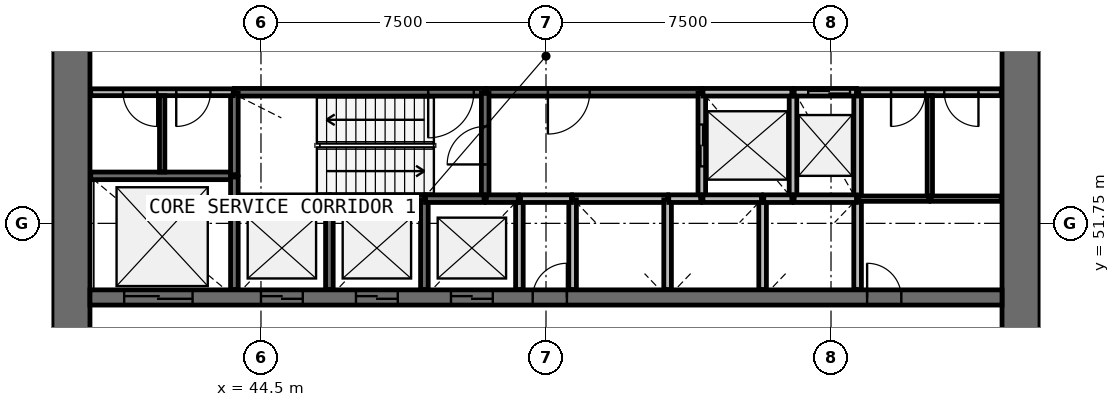
"""IFC4 building model, lengths in metres.
Left out: names, types, materials, properties, quantities, classifications, styles, units other than length and angle.
Written with IfcOpenShell. Run it as: python <this file> out.ifc"""

import sys

from ifc_helpers import new_model, si_unit, direction, frame, frame_2d, origin, place, context, subcontext, project, spatial, rectangle, extrude, source, transform, mapped, element, fill, save


model = new_model("IFC4")
c1 = context("Model", 3, precision=1e-05, world=origin(), true_north=direction((0.0, 1.0)))
c2 = subcontext(c1, "Body", "Model", "MODEL_VIEW")
j1 = project(units=[si_unit("LENGTHUNIT", "METRE"), si_unit("PLANEANGLEUNIT", "RADIAN")], contexts=[c1])
p1 = place(None, origin())
s1 = spatial("IfcSite", under=j1, at=p1, CompositionType="ELEMENT")
p2 = place(p1, origin())
s2 = spatial("IfcBuilding", under=s1, at=p2, CompositionType="ELEMENT")
p3 = place(p2, frame((0.0, 0.0, 18.2)))
s3 = spatial("IfcBuildingStorey", under=s2, at=p3, CompositionType="ELEMENT", Elevation=18.2)
p4 = place(p3, frame((64.5, 38.0, 0.0), z_axis=(0.0, 0.0, 1.0), x_axis=(0.0, 1.0, 0.0)))
e1 = element("IfcWall", 1, at=p4, inside=s3, PredefinedType="SHEAR", context=c2, shape_type="SweptSolid", body=[
    extrude(rectangle(XDim=20.0, YDim=1.0, at=frame_2d((10.0, 0.0))), origin(), (0.0, 0.0, 1.0), 4.4),
])
p5 = place(p4, frame((9.1, 0.0, 0.0)))
e2 = element("IfcOpeningElement", 2, at=p5, cuts=e1, PredefinedType="OPENING", context=c2, shape_type="SweptSolid", body=[
    extrude(rectangle(XDim=1.8, YDim=2.1, at=frame_2d((0.9, 1.05))), frame((0.0, 0.51, 0.0), z_axis=(0.0, -1.0, 0.0), x_axis=(1.0, 0.0, 0.0)), (0.0, 0.0, 1.0), 1.02),
])
p6 = place(p3, frame((39.5, 58.0, 0.0), z_axis=(0.0, 0.0, 1.0), x_axis=(0.0, -1.0, 0.0)))
e3 = element("IfcWall", 3, at=p6, inside=s3, PredefinedType="SHEAR", context=c2, shape_type="SweptSolid", body=[
    extrude(rectangle(XDim=20.0, YDim=1.0, at=frame_2d((10.0, 0.0))), origin(), (0.0, 0.0, 1.0), 4.4),
])
p7 = place(p6, frame((9.1, 0.0, 0.0)))
e4 = element("IfcOpeningElement", 4, at=p7, cuts=e3, PredefinedType="OPENING", context=c2, shape_type="SweptSolid", body=[
    extrude(rectangle(XDim=1.8, YDim=2.1, at=frame_2d((0.9, 1.05))), frame((0.0, 0.51, 0.0), z_axis=(0.0, -1.0, 0.0), x_axis=(1.0, 0.0, 0.0)), (0.0, 0.0, 1.0), 1.02),
])
p8 = place(p3, frame((40.0, 49.8, 0.0), z_axis=(0.0, 0.0, 1.0), x_axis=(1.0, 0.0, 0.0)))
e5 = element("IfcWall", 5, at=p8, inside=s3, PredefinedType="SHEAR", context=c2, shape_type="SweptSolid", body=[
    extrude(rectangle(XDim=24.0, YDim=0.4, at=frame_2d((12.0, 0.0))), origin(), (0.0, 0.0, 1.0), 4.4),
])
p9 = place(p8, frame((4.5, 0.0, 0.0)))
e6 = element("IfcOpeningElement", 6, at=p9, cuts=e5, PredefinedType="OPENING", context=c2, shape_type="SweptSolid", body=[
    extrude(rectangle(XDim=1.1, YDim=2.1, at=frame_2d((0.55, 1.05))), frame((0.0, 0.21, 0.0), z_axis=(0.0, -1.0, 0.0), x_axis=(1.0, 0.0, 0.0)), (0.0, 0.0, 1.0), 0.42),
])
p10 = place(p8, frame((7.0, 0.0, 0.0)))
e7 = element("IfcOpeningElement", 7, at=p10, cuts=e5, PredefinedType="OPENING", context=c2, shape_type="SweptSolid", body=[
    extrude(rectangle(XDim=1.1, YDim=2.1, at=frame_2d((0.55, 1.05))), frame((0.0, 0.21, 0.0), z_axis=(0.0, -1.0, 0.0), x_axis=(1.0, 0.0, 0.0)), (0.0, 0.0, 1.0), 0.42),
])
p11 = place(p8, frame((9.5, 0.0, 0.0)))
e8 = element("IfcOpeningElement", 8, at=p11, cuts=e5, PredefinedType="OPENING", context=c2, shape_type="SweptSolid", body=[
    extrude(rectangle(XDim=1.1, YDim=2.1, at=frame_2d((0.55, 1.05))), frame((0.0, 0.21, 0.0), z_axis=(0.0, -1.0, 0.0), x_axis=(1.0, 0.0, 0.0)), (0.0, 0.0, 1.0), 0.42),
])
p12 = place(p8, frame((0.9, 0.0, 0.0)))
e9 = element("IfcOpeningElement", 9, at=p12, cuts=e5, PredefinedType="OPENING", context=c2, shape_type="SweptSolid", body=[
    extrude(rectangle(XDim=1.8, YDim=2.4, at=frame_2d((0.9, 1.2))), frame((0.0, 0.21, 0.0), z_axis=(0.0, -1.0, 0.0), x_axis=(1.0, 0.0, 0.0)), (0.0, 0.0, 1.0), 0.42),
])
p13 = place(p8, frame((20.45, 0.0, 0.0)))
e10 = element("IfcOpeningElement", 10, at=p13, cuts=e5, PredefinedType="OPENING", context=c2, shape_type="SweptSolid", body=[
    extrude(rectangle(XDim=0.9, YDim=2.1, at=frame_2d((0.45, 1.05))), frame((0.0, 0.21, 0.0), z_axis=(0.0, -1.0, 0.0), x_axis=(1.0, 0.0, 0.0)), (0.0, 0.0, 1.0), 0.42),
])
p14 = place(p8, frame((11.65, 0.0, 0.0)))
e11 = element("IfcOpeningElement", 11, at=p14, cuts=e5, PredefinedType="OPENING", context=c2, shape_type="SweptSolid", body=[
    extrude(rectangle(XDim=0.9, YDim=2.1, at=frame_2d((0.45, 1.05))), frame((0.0, 0.21, 0.0), z_axis=(0.0, -1.0, 0.0), x_axis=(1.0, 0.0, 0.0)), (0.0, 0.0, 1.0), 0.42),
])
p15 = place(p3, frame((50.4, 55.2, 0.0), z_axis=(0.0, 0.0, 1.0), x_axis=(-1.0, 0.0, 0.0)))
e12 = element("IfcWall", 12, at=p15, inside=s3, PredefinedType="SOLIDWALL", context=c2, shape_type="SweptSolid", body=[
    extrude(rectangle(XDim=6.6, YDim=0.2, at=frame_2d((3.3, 0.0))), origin(), (0.0, 0.0, 1.0), 3.95),
])
p16 = place(p15, frame((0.3, 0.0, 0.0)))
e13 = element("IfcOpeningElement", 13, at=p16, cuts=e12, PredefinedType="OPENING", context=c2, shape_type="SweptSolid", body=[
    extrude(rectangle(XDim=1.2, YDim=2.1, at=frame_2d((0.6, 1.05))), frame((0.0, 0.11, 0.0), z_axis=(0.0, -1.0, 0.0), x_axis=(1.0, 0.0, 0.0)), (0.0, 0.0, 1.0), 0.22),
])
p17 = place(p3, frame((56.1, 55.2, 0.0), z_axis=(0.0, 0.0, 1.0), x_axis=(-1.0, 0.0, 0.0)))
e14 = element("IfcWall", 14, at=p17, inside=s3, PredefinedType="SOLIDWALL", context=c2, shape_type="SweptSolid", body=[
    extrude(rectangle(XDim=5.67, YDim=0.2, at=frame_2d((2.835, 0.0))), origin(), (0.0, 0.0, 1.0), 3.95),
])
p18 = place(p17, frame((2.95, 0.0, 0.0)))
e15 = element("IfcOpeningElement", 15, at=p18, cuts=e14, PredefinedType="OPENING", context=c2, shape_type="SweptSolid", body=[
    extrude(rectangle(XDim=1.1, YDim=2.1, at=frame_2d((0.55, 1.05))), frame((0.0, 0.11, 0.0), z_axis=(0.0, -1.0, 0.0), x_axis=(1.0, 0.0, 0.0)), (0.0, 0.0, 1.0), 0.22),
])
p19 = place(p3, frame((43.8, 53.0, 0.0), z_axis=(0.0, 0.0, 1.0), x_axis=(-1.0, 0.0, 0.0)))
e16 = element("IfcWall", 16, at=p19, inside=s3, PredefinedType="SOLIDWALL", context=c2, shape_type="SweptSolid", body=[
    extrude(rectangle(XDim=3.78, YDim=0.2, at=frame_2d((1.89, 0.0))), origin(), (0.0, 0.0, 1.0), 3.95),
])
p20 = place(p3, frame((50.4, 52.4, 0.0), z_axis=(0.0, 0.0, 1.0), x_axis=(0.0, 1.0, 0.0)))
e17 = element("IfcWall", 17, at=p20, inside=s3, PredefinedType="SOLIDWALL", context=c2, shape_type="SweptSolid", body=[
    extrude(rectangle(XDim=2.77, YDim=0.2, at=frame_2d((1.385, 0.0))), origin(), (0.0, 0.0, 1.0), 3.95),
])
p21 = place(p20, frame((0.9, 0.0, 0.0)))
e18 = element("IfcOpeningElement", 18, at=p21, cuts=e17, PredefinedType="OPENING", context=c2, shape_type="SweptSolid", body=[
    extrude(rectangle(XDim=1.0, YDim=2.1, at=frame_2d((0.5, 1.05))), frame((0.0, 0.11, 0.0), z_axis=(0.0, -1.0, 0.0), x_axis=(1.0, 0.0, 0.0)), (0.0, 0.0, 1.0), 0.22),
])
p22 = place(p3, frame((56.1, 55.17, 0.0), z_axis=(0.0, 0.0, 1.0), x_axis=(0.0, -1.0, 0.0)))
e19 = element("IfcWall", 19, at=p22, inside=s3, PredefinedType="SOLIDWALL", context=c2, shape_type="SweptSolid", body=[
    extrude(rectangle(XDim=2.77, YDim=0.2, at=frame_2d((1.385, 0.0))), origin(), (0.0, 0.0, 1.0), 3.95),
])
p23 = place(p22, frame((0.82, 0.0, 0.0)))
e20 = element("IfcOpeningElement", 20, at=p23, cuts=e19, PredefinedType="OPENING", context=c2, shape_type="SweptSolid", body=[
    extrude(rectangle(XDim=1.1, YDim=2.1, at=frame_2d((0.55, 1.05))), frame((0.0, 0.11, 0.0), z_axis=(0.0, -1.0, 0.0), x_axis=(1.0, 0.0, 0.0)), (0.0, 0.0, 1.0), 0.22),
])
for number, where, z_axis, x_axis in (
    (21, (58.5, 52.4, 0.0), (0.0, 0.0, 1.0), (0.0, 1.0, 0.0)),
    (22, (60.2, 52.4, 0.0), (0.0, 0.0, 1.0), (0.0, 1.0, 0.0)),
):
    element("IfcWall", number, at=place(p3, frame(where, z_axis=z_axis, x_axis=x_axis)), inside=s3, PredefinedType="SOLIDWALL", context=c2, shape_type="SweptSolid", body=[
        extrude(rectangle(XDim=2.8, YDim=0.2, at=frame_2d((1.4, 0.0))), origin(), (0.0, 0.0, 1.0), 3.95),
    ])
p24 = place(p3, frame((46.3, 52.4, 0.0), z_axis=(0.0, 0.0, 1.0), x_axis=(-1.0, 0.0, 0.0)))
e23 = element("IfcWall", 23, at=p24, inside=s3, PredefinedType="SOLIDWALL", context=c2, shape_type="SweptSolid", body=[
    extrude(rectangle(XDim=2.5, YDim=0.2, at=frame_2d((1.25, 0.0))), origin(), (0.0, 0.0, 1.0), 3.95),
])
p25 = place(p3, frame((48.8, 52.4, 0.0), z_axis=(0.0, 0.0, 1.0), x_axis=(-1.0, 0.0, 0.0)))
e24 = element("IfcWall", 24, at=p25, inside=s3, PredefinedType="SOLIDWALL", context=c2, shape_type="SweptSolid", body=[
    extrude(rectangle(XDim=2.47, YDim=0.2, at=frame_2d((1.235, 0.0))), origin(), (0.0, 0.0, 1.0), 3.95),
])
p26 = place(p3, frame((55.2, 52.4, 0.0), z_axis=(0.0, 0.0, 1.0), x_axis=(-1.0, 0.0, 0.0)))
e25 = element("IfcWall", 25, at=p26, inside=s3, PredefinedType="SOLIDWALL", context=c2, shape_type="SweptSolid", body=[
    extrude(rectangle(XDim=2.5, YDim=0.2, at=frame_2d((1.25, 0.0))), origin(), (0.0, 0.0, 1.0), 3.95),
])
p27 = place(p3, frame((58.47, 55.2, 0.0), z_axis=(0.0, 0.0, 1.0), x_axis=(-1.0, 0.0, 0.0)))
e26 = element("IfcWall", 26, at=p27, inside=s3, PredefinedType="SOLIDWALL", context=c2, shape_type="SweptSolid", body=[
    extrude(rectangle(XDim=2.34, YDim=0.2, at=frame_2d((1.17, 0.0))), origin(), (0.0, 0.0, 1.0), 3.95),
])
for number, where, z_axis, x_axis in (
    (27, (43.8, 52.37, 0.0), (0.0, 0.0, 1.0), (0.0, -1.0, 0.0)),
    (28, (46.3, 50.01, 0.0), (0.0, 0.0, 1.0), (0.0, 1.0, 0.0)),
    (29, (48.8, 50.01, 0.0), (0.0, 0.0, 1.0), (0.0, 1.0, 0.0)),
):
    element("IfcWall", number, at=place(p3, frame(where, z_axis=z_axis, x_axis=x_axis)), inside=s3, PredefinedType="SOLIDWALL", context=c2, shape_type="SweptSolid", body=[
        extrude(rectangle(XDim=2.36, YDim=0.2, at=frame_2d((1.18, 0.0))), origin(), (0.0, 0.0, 1.0), 3.95),
    ])
p28 = place(p3, frame((51.3, 50.01, 0.0), z_axis=(0.0, 0.0, 1.0), x_axis=(0.0, 1.0, 0.0)))
e30 = element("IfcWall", 30, at=p28, inside=s3, PredefinedType="SOLIDWALL", context=c2, shape_type="SweptSolid", body=[
    extrude(rectangle(XDim=2.39, YDim=0.2, at=frame_2d((1.195, 0.0))), origin(), (0.0, 0.0, 1.0), 3.95),
])
for number, where, z_axis, x_axis in (
    (31, (52.7, 52.37, 0.0), (0.0, 0.0, 1.0), (0.0, -1.0, 0.0)),
    (32, (55.2, 50.01, 0.0), (0.0, 0.0, 1.0), (0.0, 1.0, 0.0)),
):
    element("IfcWall", number, at=place(p3, frame(where, z_axis=z_axis, x_axis=x_axis)), inside=s3, PredefinedType="SOLIDWALL", context=c2, shape_type="SweptSolid", body=[
        extrude(rectangle(XDim=2.36, YDim=0.2, at=frame_2d((1.18, 0.0))), origin(), (0.0, 0.0, 1.0), 3.95),
    ])
p29 = place(p3, frame((57.7, 50.01, 0.0), z_axis=(0.0, 0.0, 1.0), x_axis=(0.0, 1.0, 0.0)))
e33 = element("IfcWall", 33, at=p29, inside=s3, PredefinedType="SOLIDWALL", context=c2, shape_type="SweptSolid", body=[
    extrude(rectangle(XDim=2.39, YDim=0.2, at=frame_2d((1.195, 0.0))), origin(), (0.0, 0.0, 1.0), 3.95),
])
p30 = place(p3, frame((60.2, 50.01, 0.0), z_axis=(0.0, 0.0, 1.0), x_axis=(0.0, 1.0, 0.0)))
e34 = element("IfcWall", 34, at=p30, inside=s3, PredefinedType="SOLIDWALL", context=c2, shape_type="SweptSolid", body=[
    extrude(rectangle(XDim=2.36, YDim=0.2, at=frame_2d((1.18, 0.0))), origin(), (0.0, 0.0, 1.0), 3.95),
])
p31 = place(p3, frame((43.8, 55.17, 0.0), z_axis=(0.0, 0.0, 1.0), x_axis=(0.0, -1.0, 0.0)))
e35 = element("IfcWall", 35, at=p31, inside=s3, PredefinedType="SOLIDWALL", context=c2, shape_type="SweptSolid", body=[
    extrude(rectangle(XDim=2.14, YDim=0.2, at=frame_2d((1.07, 0.0))), origin(), (0.0, 0.0, 1.0), 3.95),
])
p32 = place(p3, frame((60.17, 52.4, 0.0), z_axis=(0.0, 0.0, 1.0), x_axis=(-1.0, 0.0, 0.0)))
e36 = element("IfcWall", 36, at=p32, inside=s3, PredefinedType="SOLIDWALL", context=c2, shape_type="SweptSolid", body=[
    extrude(rectangle(XDim=1.64, YDim=0.2, at=frame_2d((0.82, 0.0))), origin(), (0.0, 0.0, 1.0), 3.95),
])
p33 = place(p3, frame((60.17, 55.2, 0.0), z_axis=(0.0, 0.0, 1.0), x_axis=(-1.0, 0.0, 0.0)))
e37 = element("IfcWall", 37, at=p33, inside=s3, PredefinedType="SOLIDWALL", context=c2, shape_type="SweptSolid", body=[
    extrude(rectangle(XDim=1.64, YDim=0.2, at=frame_2d((0.82, 0.0))), origin(), (0.0, 0.0, 1.0), 3.95),
])
p34 = place(p33, frame((0.17, 0.0, 0.0)))
e38 = element("IfcOpeningElement", 38, at=p34, cuts=e37, PredefinedType="OPENING", context=c2, shape_type="SweptSolid", body=[
    extrude(rectangle(XDim=1.1, YDim=2.1, at=frame_2d((0.55, 1.05))), frame((0.0, 0.11, 0.0), z_axis=(0.0, -1.0, 0.0), x_axis=(1.0, 0.0, 0.0)), (0.0, 0.0, 1.0), 0.22),
])
for number, where, z_axis, x_axis in (
    (39, (50.37, 52.4, 0.0), (0.0, 0.0, 1.0), (-1.0, 0.0, 0.0)),
    (40, (57.67, 52.4, 0.0), (0.0, 0.0, 1.0), (-1.0, 0.0, 0.0)),
):
    element("IfcWall", number, at=place(p3, frame(where, z_axis=z_axis, x_axis=x_axis)), inside=s3, PredefinedType="SOLIDWALL", context=c2, shape_type="SweptSolid", body=[
        extrude(rectangle(XDim=1.54, YDim=0.2, at=frame_2d((0.77, 0.0))), origin(), (0.0, 0.0, 1.0), 3.95),
    ])
p35 = place(p3, frame((51.33, 52.4, 0.0), z_axis=(0.0, 0.0, 1.0), x_axis=(1.0, 0.0, 0.0)))
e41 = element("IfcWall", 41, at=p35, inside=s3, PredefinedType="SOLIDWALL", context=c2, shape_type="SweptSolid", body=[
    extrude(rectangle(XDim=1.34, YDim=0.2, at=frame_2d((0.67, 0.0))), origin(), (0.0, 0.0, 1.0), 3.95),
])
for number, where, z_axis, x_axis in (
    (42, (51.27, 52.4, 0.0), (0.0, 0.0, 1.0), (-1.0, 0.0, 0.0)),
    (43, (56.07, 52.4, 0.0), (0.0, 0.0, 1.0), (-1.0, 0.0, 0.0)),
):
    element("IfcWall", number, at=place(p3, frame(where, z_axis=z_axis, x_axis=x_axis)), inside=s3, PredefinedType="SOLIDWALL", context=c2, shape_type="SweptSolid", body=[
        extrude(rectangle(XDim=0.84, YDim=0.2, at=frame_2d((0.42, 0.0))), origin(), (0.0, 0.0, 1.0), 3.95),
    ])
p36 = place(p3, frame((58.47, 52.4, 0.0), z_axis=(0.0, 0.0, 1.0), x_axis=(-1.0, 0.0, 0.0)))
e44 = element("IfcWall", 44, at=p36, inside=s3, PredefinedType="SOLIDWALL", context=c2, shape_type="SweptSolid", body=[
    extrude(rectangle(XDim=0.74, YDim=0.2, at=frame_2d((0.37, 0.0))), origin(), (0.0, 0.0, 1.0), 3.95),
])
p37 = place(p3, frame((43.8, 52.43, 0.0), z_axis=(0.0, 0.0, 1.0), x_axis=(0.0, 1.0, 0.0)))
e45 = element("IfcWall", 45, at=p37, inside=s3, PredefinedType="SOLIDWALL", context=c2, shape_type="SweptSolid", body=[
    extrude(rectangle(XDim=0.54, YDim=0.2, at=frame_2d((0.27, 0.0))), origin(), (0.0, 0.0, 1.0), 3.95),
])
p38 = place(p3, frame((43.77, 55.2, 0.0), z_axis=(0.0, 0.0, 1.0), x_axis=(-1.0, 0.0, 0.0)))
e46 = element("IfcWall", 46, at=p38, inside=s3, PredefinedType="PARTITIONING", context=c2, shape_type="SweptSolid", body=[
    extrude(rectangle(XDim=3.75, YDim=0.18, at=frame_2d((1.875, 0.0))), origin(), (0.0, 0.0, 1.0), 3.95),
])
p39 = place(p38, frame((2.0, 0.0, 0.0)))
e47 = element("IfcOpeningElement", 47, at=p39, cuts=e46, PredefinedType="OPENING", context=c2, shape_type="SweptSolid", body=[
    extrude(rectangle(XDim=0.9, YDim=2.1, at=frame_2d((0.45, 1.05))), frame((0.0, 0.1, 0.0), z_axis=(0.0, -1.0, 0.0), x_axis=(1.0, 0.0, 0.0)), (0.0, 0.0, 1.0), 0.2),
])
p40 = place(p38, frame((0.6, 0.0, 0.0)))
e48 = element("IfcOpeningElement", 48, at=p40, cuts=e46, PredefinedType="OPENING", context=c2, shape_type="SweptSolid", body=[
    extrude(rectangle(XDim=0.9, YDim=2.1, at=frame_2d((0.45, 1.05))), frame((0.0, 0.1, 0.0), z_axis=(0.0, -1.0, 0.0), x_axis=(1.0, 0.0, 0.0)), (0.0, 0.0, 1.0), 0.2),
])
p41 = place(p3, frame((63.98, 55.2, 0.0), z_axis=(0.0, 0.0, 1.0), x_axis=(-1.0, 0.0, 0.0)))
e49 = element("IfcWall", 49, at=p41, inside=s3, PredefinedType="PARTITIONING", context=c2, shape_type="SweptSolid", body=[
    extrude(rectangle(XDim=3.75, YDim=0.18, at=frame_2d((1.875, 0.0))), origin(), (0.0, 0.0, 1.0), 3.95),
])
p42 = place(p41, frame((2.0, 0.0, 0.0)))
e50 = element("IfcOpeningElement", 50, at=p42, cuts=e49, PredefinedType="OPENING", context=c2, shape_type="SweptSolid", body=[
    extrude(rectangle(XDim=0.9, YDim=2.1, at=frame_2d((0.45, 1.05))), frame((0.0, 0.1, 0.0), z_axis=(0.0, -1.0, 0.0), x_axis=(1.0, 0.0, 0.0)), (0.0, 0.0, 1.0), 0.2),
])
p43 = place(p41, frame((0.6, 0.0, 0.0)))
e51 = element("IfcOpeningElement", 51, at=p43, cuts=e49, PredefinedType="OPENING", context=c2, shape_type="SweptSolid", body=[
    extrude(rectangle(XDim=0.9, YDim=2.1, at=frame_2d((0.45, 1.05))), frame((0.0, 0.1, 0.0), z_axis=(0.0, -1.0, 0.0), x_axis=(1.0, 0.0, 0.0)), (0.0, 0.0, 1.0), 0.2),
])
p44 = place(p3, frame((62.1, 52.4, 0.0), z_axis=(0.0, 0.0, 1.0), x_axis=(0.0, 1.0, 0.0)))
e52 = element("IfcWall", 52, at=p44, inside=s3, PredefinedType="PARTITIONING", context=c2, shape_type="SweptSolid", body=[
    extrude(rectangle(XDim=2.71, YDim=0.14, at=frame_2d((1.355, 0.0))), origin(), (0.0, 0.0, 1.0), 3.15),
])
p45 = place(p3, frame((41.9, 53.1, 0.0), z_axis=(0.0, 0.0, 1.0), x_axis=(0.0, 1.0, 0.0)))
e53 = element("IfcWall", 53, at=p45, inside=s3, PredefinedType="PARTITIONING", context=c2, shape_type="SweptSolid", body=[
    extrude(rectangle(XDim=2.01, YDim=0.14, at=frame_2d((1.005, 0.0))), origin(), (0.0, 0.0, 1.0), 3.15),
])
p46 = place(p3, frame((62.07, 52.4, 0.0), z_axis=(0.0, 0.0, 1.0), x_axis=(-1.0, 0.0, 0.0)))
e54 = element("IfcWall", 54, at=p46, inside=s3, PredefinedType="PARTITIONING", context=c2, shape_type="SweptSolid", body=[
    extrude(rectangle(XDim=1.84, YDim=0.14, at=frame_2d((0.92, 0.0))), origin(), (0.0, 0.0, 1.0), 3.15),
])
p47 = place(p3, frame((63.98, 52.4, 0.0), z_axis=(0.0, 0.0, 1.0), x_axis=(-1.0, 0.0, 0.0)))
e55 = element("IfcWall", 55, at=p47, inside=s3, PredefinedType="PARTITIONING", context=c2, shape_type="SweptSolid", body=[
    extrude(rectangle(XDim=1.85, YDim=0.14, at=frame_2d((0.925, 0.0))), origin(), (0.0, 0.0, 1.0), 3.15),
])
m1 = source(origin(), c2, "Body", "SweptSolid", [
    extrude(rectangle(XDim=1.1, YDim=2.1, at=frame_2d((0.55, 1.05))), frame((0.0, 0.025, 0.0), z_axis=(0.0, -1.0, 0.0), x_axis=(1.0, 0.0, 0.0)), (0.0, 0.0, 1.0), 0.05),
])
p48 = place(p9, origin())
e56 = element("IfcDoor", 56, at=p48, inside=s3, OperationType="DOUBLE_DOOR_SLIDING", PredefinedType="USERDEFINED", context=c2, shape_type="MappedRepresentation", body=[
    mapped(m1, transform((0.0, 0.0, 0.0), scale=1.0)),
])
fill(e6, e56)
p49 = place(p10, origin())
e57 = element("IfcDoor", 57, at=p49, inside=s3, OperationType="DOUBLE_DOOR_SLIDING", PredefinedType="USERDEFINED", context=c2, shape_type="MappedRepresentation", body=[
    mapped(m1, transform((0.0, 0.0, 0.0), scale=1.0)),
])
fill(e7, e57)
p50 = place(p11, origin())
e58 = element("IfcDoor", 58, at=p50, inside=s3, OperationType="DOUBLE_DOOR_SLIDING", PredefinedType="USERDEFINED", context=c2, shape_type="MappedRepresentation", body=[
    mapped(m1, transform((0.0, 0.0, 0.0), scale=1.0)),
])
fill(e8, e58)
p51 = place(p23, origin())
e59 = element("IfcDoor", 59, at=p51, inside=s3, OperationType="DOUBLE_DOOR_SLIDING", PredefinedType="USERDEFINED", context=c2, shape_type="MappedRepresentation", body=[
    mapped(m1, transform((0.0, 0.0, 0.0), scale=1.0)),
])
fill(e20, e59)
p52 = place(p34, origin())
e60 = element("IfcDoor", 60, at=p52, inside=s3, OperationType="DOUBLE_DOOR_SLIDING", PredefinedType="USERDEFINED", context=c2, shape_type="MappedRepresentation", body=[
    mapped(m1, transform((0.0, 0.0, 0.0), scale=1.0)),
])
fill(e38, e60)
m2 = source(origin(), c2, "Body", "SweptSolid", [
    extrude(rectangle(XDim=1.8, YDim=2.4, at=frame_2d((0.9, 1.2))), frame((0.0, 0.025, 0.0), z_axis=(0.0, -1.0, 0.0), x_axis=(1.0, 0.0, 0.0)), (0.0, 0.0, 1.0), 0.05),
])
p53 = place(p12, origin())
e61 = element("IfcDoor", 61, at=p53, inside=s3, OperationType="DOUBLE_DOOR_SLIDING", PredefinedType="USERDEFINED", context=c2, shape_type="MappedRepresentation", body=[
    mapped(m2, transform((0.0, 0.0, 0.0), scale=1.0)),
])
fill(e9, e61)
m3 = source(origin(), c2, "Body", "SweptSolid", [
    extrude(rectangle(XDim=1.2, YDim=2.1, at=frame_2d((0.6, 1.05))), frame((0.0, 0.025, 0.0), z_axis=(0.0, -1.0, 0.0), x_axis=(1.0, 0.0, 0.0)), (0.0, 0.0, 1.0), 0.05),
])
p54 = place(p16, origin())
e62 = element("IfcDoor", 62, at=p54, inside=s3, OperationType="SINGLE_SWING_RIGHT", PredefinedType="DOOR", context=c2, shape_type="MappedRepresentation", body=[
    mapped(m3, transform((0.0, 0.0, 0.0), scale=1.0)),
])
fill(e13, e62)
m4 = source(origin(), c2, "Body", "SweptSolid", [
    extrude(rectangle(XDim=1.0, YDim=2.1, at=frame_2d((0.5, 1.05))), frame((0.0, 0.025, 0.0), z_axis=(0.0, -1.0, 0.0), x_axis=(1.0, 0.0, 0.0)), (0.0, 0.0, 1.0), 0.05),
])
p55 = place(p21, origin())
e63 = element("IfcDoor", 63, at=p55, inside=s3, OperationType="SINGLE_SWING_LEFT", PredefinedType="DOOR", context=c2, shape_type="MappedRepresentation", body=[
    mapped(m4, transform((0.0, 0.0, 0.0), scale=1.0)),
])
fill(e18, e63)
m5 = source(origin(), c2, "Body", "SweptSolid", [
    extrude(rectangle(XDim=1.1, YDim=2.1, at=frame_2d((0.55, 1.05))), frame((0.0, 0.025, 0.0), z_axis=(0.0, -1.0, 0.0), x_axis=(1.0, 0.0, 0.0)), (0.0, 0.0, 1.0), 0.05),
])
p56 = place(p18, origin())
e64 = element("IfcDoor", 64, at=p56, inside=s3, OperationType="SINGLE_SWING_RIGHT", PredefinedType="DOOR", context=c2, shape_type="MappedRepresentation", body=[
    mapped(m5, transform((0.0, 0.0, 0.0), scale=1.0)),
])
fill(e15, e64)
m6 = source(origin(), c2, "Body", "SweptSolid", [
    extrude(rectangle(XDim=0.9, YDim=2.1, at=frame_2d((0.45, 1.05))), frame((0.0, 0.025, 0.0), z_axis=(0.0, -1.0, 0.0), x_axis=(1.0, 0.0, 0.0)), (0.0, 0.0, 1.0), 0.05),
])
p57 = place(p39, origin())
e65 = element("IfcDoor", 65, at=p57, inside=s3, OperationType="SINGLE_SWING_LEFT", PredefinedType="DOOR", context=c2, shape_type="MappedRepresentation", body=[
    mapped(m6, transform((0.0, 0.0, 0.0), scale=1.0)),
])
fill(e47, e65)
p58 = place(p40, origin())
e66 = element("IfcDoor", 66, at=p58, inside=s3, OperationType="SINGLE_SWING_RIGHT", PredefinedType="DOOR", context=c2, shape_type="MappedRepresentation", body=[
    mapped(m6, transform((0.0, 0.0, 0.0), scale=1.0)),
])
fill(e48, e66)
p59 = place(p13, origin())
e67 = element("IfcDoor", 67, at=p59, inside=s3, OperationType="SINGLE_SWING_LEFT", PredefinedType="DOOR", context=c2, shape_type="MappedRepresentation", body=[
    mapped(m6, transform((0.0, 0.0, 0.0), scale=1.0)),
])
fill(e10, e67)
p60 = place(p42, origin())
e68 = element("IfcDoor", 68, at=p60, inside=s3, OperationType="SINGLE_SWING_RIGHT", PredefinedType="DOOR", context=c2, shape_type="MappedRepresentation", body=[
    mapped(m6, transform((0.0, 0.0, 0.0), scale=1.0)),
])
fill(e50, e68)
p61 = place(p43, origin())
e69 = element("IfcDoor", 69, at=p61, inside=s3, OperationType="SINGLE_SWING_LEFT", PredefinedType="DOOR", context=c2, shape_type="MappedRepresentation", body=[
    mapped(m6, transform((0.0, 0.0, 0.0), scale=1.0)),
])
fill(e51, e69)
p62 = place(p14, origin())
e70 = element("IfcDoor", 70, at=p62, inside=s3, OperationType="SINGLE_SWING_RIGHT", PredefinedType="DOOR", context=c2, shape_type="MappedRepresentation", body=[
    mapped(m6, transform((0.0, 0.0, 0.0), scale=1.0)),
])
fill(e11, e70)
save(model, sys.argv[1])
